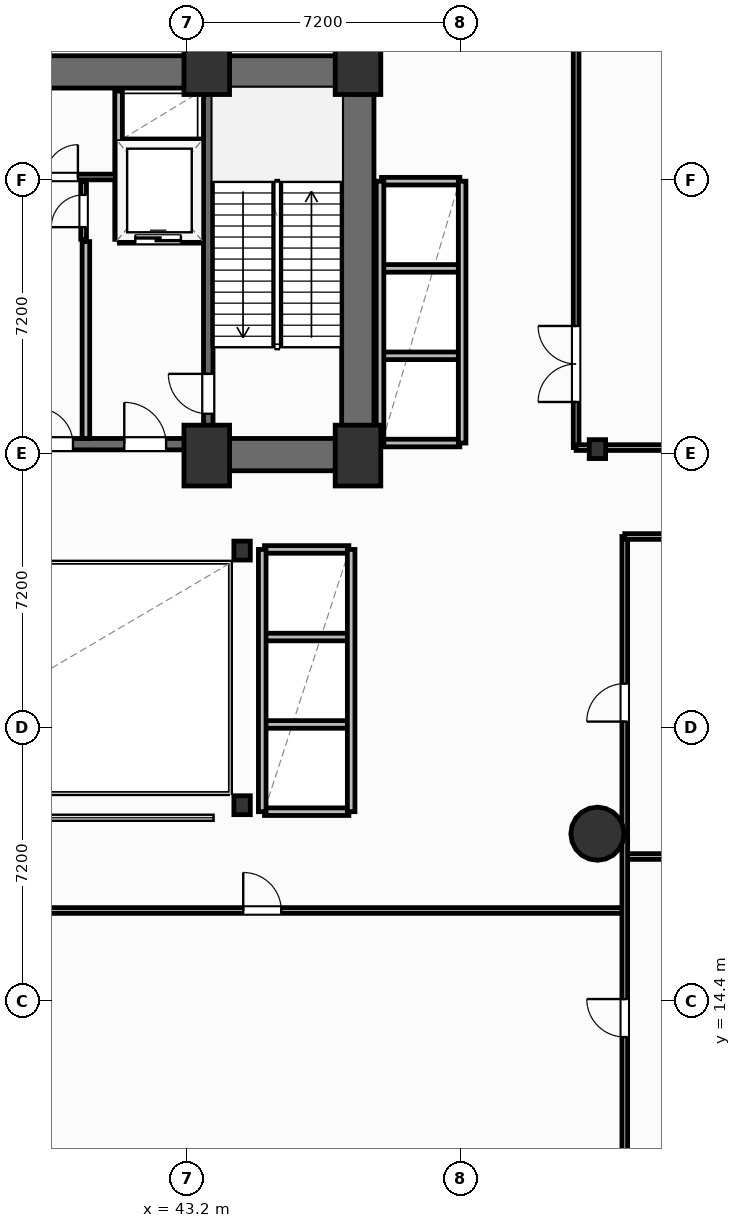
"""IFC4 building model, lengths in metres.
Left out: names, types, materials, properties, quantities, classifications, styles, units other than length and angle.
Written with IfcOpenShell. Run it as: python <this file> out.ifc"""

import sys

from ifc_helpers import new_model, si_unit, direction, frame, frame_2d, origin, origin_2d, place, context, subcontext, project, spatial, rectangle, circle, i_section, extrude, element, fill, save


model = new_model("IFC4")
c1 = context("Model", 3, precision=1e-05, world=origin(), true_north=direction((0.0, 1.0)))
c2 = subcontext(c1, "Body", "Model", "MODEL_VIEW")
j1 = project(units=[si_unit("LENGTHUNIT", "METRE"), si_unit("PLANEANGLEUNIT", "RADIAN")], contexts=[c1])
p1 = place(None, origin())
s1 = spatial("IfcSite", under=j1, at=p1, CompositionType="ELEMENT")
p2 = place(p1, origin())
s2 = spatial("IfcBuilding", under=s1, at=p2, CompositionType="ELEMENT")
p3 = place(p2, frame((0.0, 0.0, 21.6)))
s3 = spatial("IfcBuildingStorey", under=s2, at=p3, CompositionType="ELEMENT", Elevation=21.6)
for number, where, z_axis, x_axis in (
    (1, (43.72, 28.75, 0.0), (0.0, 0.0, 1.0), (1.0, 0.0, 0.0)),
    (2, (47.7, 28.75, 0.0), (0.0, 0.0, 1.0), (1.0, 0.0, 0.0)),
    (3, (43.72, 39.05, 0.0), (0.0, 0.0, 1.0), (1.0, 0.0, 0.0)),
    (4, (47.7, 39.05, 0.0), (0.0, 0.0, 1.0), (1.0, 0.0, 0.0)),
):
    element("IfcColumn", number, at=place(p3, frame(where, z_axis=z_axis, x_axis=x_axis)), inside=s3, PredefinedType="COLUMN", context=c2, shape_type="SweptSolid", body=[
        extrude(rectangle(XDim=1.2, YDim=1.6, at=origin_2d()), origin(), (0.0, 0.0, 1.0), 5.4),
    ])
for number, where, z_axis, x_axis in (
    (5, (44.65, 19.55, 0.0), (0.0, 0.0, 1.0), (1.0, 0.0, 0.0)),
    (6, (44.65, 26.25, 0.0), (0.0, 0.0, 1.0), (1.0, 0.0, 0.0)),
    (7, (54.0, 28.92, 0.0), (0.0, 0.0, 1.0), (1.0, 0.0, 0.0)),
):
    element("IfcColumn", number, at=place(p3, frame(where, z_axis=z_axis, x_axis=x_axis)), inside=s3, PredefinedType="COLUMN", context=c2, shape_type="SweptSolid", body=[
        extrude(i_section(OverallWidth=0.432, OverallDepth=0.498, WebThickness=0.056, FlangeThickness=0.089, FilletRadius=0.025, at=origin_2d()), origin(), (0.0, 0.0, 1.0), 5.4),
    ])
p4 = place(p3, frame((30.28, 38.845, 0.0), z_axis=(0.0, 0.0, 1.0), x_axis=(1.0, 0.0, 0.0)))
e8 = element("IfcWall", 8, at=p4, inside=s3, PredefinedType="SHEAR", context=c2, shape_type="SweptSolid", body=[
    extrude(rectangle(XDim=17.84, YDim=0.85, at=frame_2d((8.92, 0.0))), origin(), (0.0, 0.0, 1.0), 5.15),
])
p5 = place(p3, frame((47.695, 29.2, 0.0), z_axis=(0.0, 0.0, 1.0), x_axis=(0.0, 1.0, 0.0)))
e9 = element("IfcWall", 9, at=p5, inside=s3, PredefinedType="SHEAR", context=c2, shape_type="SweptSolid", body=[
    extrude(rectangle(XDim=9.22, YDim=0.85, at=frame_2d((4.61, 0.0))), origin(), (0.0, 0.0, 1.0), 5.15),
])
p6 = place(p3, frame((43.6, 28.775, 0.0), z_axis=(0.0, 0.0, 1.0), x_axis=(1.0, 0.0, 0.0)))
e10 = element("IfcWall", 10, at=p6, inside=s3, PredefinedType="SHEAR", context=c2, shape_type="SweptSolid", body=[
    extrude(rectangle(XDim=4.52, YDim=0.85, at=frame_2d((2.26, 0.0))), origin(), (0.0, 0.0, 1.0), 5.15),
])
p7 = place(p3, frame((34.8, 29.05, 0.0), z_axis=(0.0, 0.0, 1.0), x_axis=(1.0, 0.0, 0.0)))
e11 = element("IfcWall", 11, at=p7, inside=s3, PredefinedType="SHEAR", context=c2, shape_type="SweptSolid", body=[
    extrude(rectangle(XDim=8.8, YDim=0.3, at=frame_2d((4.4, 0.0))), origin(), (0.0, 0.0, 1.0), 5.15),
])
p8 = place(p7, frame((0.95, 0.0, 0.0)))
e12 = element("IfcOpeningElement", 12, at=p8, cuts=e11, PredefinedType="OPENING", context=c2, shape_type="SweptSolid", body=[
    extrude(rectangle(XDim=1.1, YDim=2.15, at=frame_2d((0.55, 1.075))), frame((0.0, 0.16, 0.0), z_axis=(0.0, -1.0, 0.0), x_axis=(1.0, 0.0, 0.0)), (0.0, 0.0, 1.0), 0.32),
])
p9 = place(p7, frame((6.75, 0.0, 0.0)))
e13 = element("IfcOpeningElement", 13, at=p9, cuts=e11, PredefinedType="OPENING", context=c2, shape_type="SweptSolid", body=[
    extrude(rectangle(XDim=1.1, YDim=2.15, at=frame_2d((0.55, 1.075))), frame((0.0, 0.16, 0.0), z_axis=(0.0, -1.0, 0.0), x_axis=(1.0, 0.0, 0.0)), (0.0, 0.0, 1.0), 0.32),
])
p10 = place(p7, frame((4.45, 0.0, 0.0)))
e14 = element("IfcOpeningElement", 14, at=p10, cuts=e11, PredefinedType="OPENING", context=c2, shape_type="SweptSolid", body=[
    extrude(rectangle(XDim=0.95, YDim=2.15, at=frame_2d((0.475, 1.075))), frame((0.0, 0.16, 0.0), z_axis=(0.0, -1.0, 0.0), x_axis=(1.0, 0.0, 0.0)), (0.0, 0.0, 1.0), 0.32),
])
p11 = place(p3, frame((43.76, 29.2, 0.0), z_axis=(0.0, 0.0, 1.0), x_axis=(0.0, 1.0, 0.0)))
e15 = element("IfcWall", 15, at=p11, inside=s3, PredefinedType="SHEAR", context=c2, shape_type="SweptSolid", body=[
    extrude(rectangle(XDim=9.22, YDim=0.25, at=frame_2d((4.61, 0.0))), origin(), (0.0, 0.0, 1.0), 5.15),
])
p12 = place(p11, frame((0.65, 0.0, 0.0)))
e16 = element("IfcOpeningElement", 16, at=p12, cuts=e15, PredefinedType="OPENING", context=c2, shape_type="SweptSolid", body=[
    extrude(rectangle(XDim=1.05, YDim=2.15, at=frame_2d((0.525, 1.075))), frame((0.0, 0.135, 0.0), z_axis=(0.0, -1.0, 0.0), x_axis=(1.0, 0.0, 0.0)), (0.0, 0.0, 1.0), 0.27),
])
p13 = place(p3, frame((54.0, 18.8, 0.0), z_axis=(0.0, 0.0, 1.0), x_axis=(1.0, 0.0, 0.0)))
e17 = element("IfcColumn", 17, at=p13, inside=s3, PredefinedType="COLUMN", context=c2, shape_type="SweptSolid", body=[
    extrude(circle(Radius=0.7, at=origin_2d()), origin(), (0.0, 0.0, 1.0), 5.4),
])
p14 = place(p3, frame((54.72, 18.2, 0.0), z_axis=(0.0, 0.0, 1.0), x_axis=(1.0, 0.0, 0.0)))
e18 = element("IfcWall", 18, at=p14, inside=s3, PredefinedType="PARTITIONING", context=c2, shape_type="SweptSolid", body=[
    extrude(rectangle(XDim=23.48, YDim=0.15, at=frame_2d((11.74, 0.0))), origin(), (0.0, 0.0, 1.0), 1.935),
])
p15 = place(p3, frame((23.68, 16.78, 0.0), z_axis=(0.0, 0.0, 1.0), x_axis=(1.0, 0.0, 0.0)))
e19 = element("IfcWall", 19, at=p15, inside=s3, PredefinedType="PARTITIONING", context=c2, shape_type="SweptSolid", body=[
    extrude(rectangle(XDim=31.04, YDim=0.15, at=frame_2d((15.52, 0.0))), origin(), (0.0, 0.0, 1.0), 5.15),
])
p16 = place(p15, frame((6.5, 0.0, 0.0)))
e20 = element("IfcOpeningElement", 20, at=p16, cuts=e19, PredefinedType="OPENING", context=c2, shape_type="SweptSolid", body=[
    extrude(rectangle(XDim=1.0, YDim=2.05, at=frame_2d((0.5, 1.025))), frame((0.0, 0.085, 0.0), z_axis=(0.0, -1.0, 0.0), x_axis=(1.0, 0.0, 0.0)), (0.0, 0.0, 1.0), 0.17),
])
p17 = place(p15, frame((21.0, 0.0, 0.0)))
e21 = element("IfcOpeningElement", 21, at=p17, cuts=e19, PredefinedType="OPENING", context=c2, shape_type="SweptSolid", body=[
    extrude(rectangle(XDim=1.0, YDim=2.05, at=frame_2d((0.5, 1.025))), frame((0.0, 0.085, 0.0), z_axis=(0.0, -1.0, 0.0), x_axis=(1.0, 0.0, 0.0)), (0.0, 0.0, 1.0), 0.17),
])
p18 = place(p3, frame((54.72, 0.25, 0.0), z_axis=(0.0, 0.0, 1.0), x_axis=(0.0, 1.0, 0.0)))
e22 = element("IfcWall", 22, at=p18, inside=s3, PredefinedType="PARTITIONING", context=c2, shape_type="SweptSolid", body=[
    extrude(rectangle(XDim=26.37, YDim=0.15, at=frame_2d((13.185, 0.0))), origin(), (0.0, 0.0, 1.0), 5.15),
])
p19 = place(p18, frame((21.5, 0.0, 0.0)))
e23 = element("IfcOpeningElement", 23, at=p19, cuts=e22, PredefinedType="OPENING", context=c2, shape_type="SweptSolid", body=[
    extrude(rectangle(XDim=1.0, YDim=2.05, at=frame_2d((0.5, 1.025))), frame((0.0, 0.085, 0.0), z_axis=(0.0, -1.0, 0.0), x_axis=(1.0, 0.0, 0.0)), (0.0, 0.0, 1.0), 0.17),
])
p20 = place(p18, frame((13.2, 0.0, 0.0)))
e24 = element("IfcOpeningElement", 24, at=p20, cuts=e22, PredefinedType="OPENING", context=c2, shape_type="SweptSolid", body=[
    extrude(rectangle(XDim=1.0, YDim=2.05, at=frame_2d((0.5, 1.025))), frame((0.0, 0.085, 0.0), z_axis=(0.0, -1.0, 0.0), x_axis=(1.0, 0.0, 0.0)), (0.0, 0.0, 1.0), 0.17),
])
p21 = place(p3, frame((54.72, 26.62, 0.0), z_axis=(0.0, 0.0, 1.0), x_axis=(1.0, 0.0, 0.0)))
e25 = element("IfcWall", 25, at=p21, inside=s3, PredefinedType="PARTITIONING", context=c2, shape_type="SweptSolid", body=[
    extrude(rectangle(XDim=23.48, YDim=0.15, at=frame_2d((11.74, 0.0))), origin(), (0.0, 0.0, 1.0), 5.15),
])
p22 = place(p3, frame((53.44, 28.96, 0.0), z_axis=(0.0, 0.0, 1.0), x_axis=(0.0, 1.0, 0.0)))
e26 = element("IfcWall", 26, at=p22, inside=s3, PredefinedType="PARTITIONING", context=c2, shape_type="SweptSolid", body=[
    extrude(rectangle(XDim=21.34, YDim=0.15, at=frame_2d((10.67, 0.0))), origin(), (0.0, 0.0, 1.0), 5.15),
])
p23 = place(p22, frame((1.2, 0.0, 0.0)))
e27 = element("IfcOpeningElement", 27, at=p23, cuts=e26, PredefinedType="OPENING", context=c2, shape_type="SweptSolid", body=[
    extrude(rectangle(XDim=2.0, YDim=2.05, at=frame_2d((1.0, 1.025))), frame((0.0, 0.085, 0.0), z_axis=(0.0, -1.0, 0.0), x_axis=(1.0, 0.0, 0.0)), (0.0, 0.0, 1.0), 0.17),
])
p24 = place(p3, frame((53.44, 28.96, 0.0), z_axis=(0.0, 0.0, 1.0), x_axis=(1.0, 0.0, 0.0)))
e28 = element("IfcWall", 28, at=p24, inside=s3, PredefinedType="PARTITIONING", context=c2, shape_type="SweptSolid", body=[
    extrude(rectangle(XDim=24.76, YDim=0.15, at=frame_2d((12.38, 0.0))), origin(), (0.0, 0.0, 1.0), 1.935),
])
p25 = place(p3, frame((40.54, 29.2, 0.0), z_axis=(0.0, 0.0, 1.0), x_axis=(0.0, 1.0, 0.0)))
e29 = element("IfcWall", 29, at=p25, inside=s3, PredefinedType="PARTITIONING", context=c2, shape_type="SweptSolid", body=[
    extrude(rectangle(XDim=5.18, YDim=0.2, at=frame_2d((2.59, 0.0))), origin(), (0.0, 0.0, 1.0), 5.15),
])
p26 = place(p3, frame((41.42, 34.44, 0.0), z_axis=(0.0, 0.0, 1.0), x_axis=(1.0, 0.0, 0.0)))
e30 = element("IfcWall", 30, at=p26, inside=s3, PredefinedType="PARTITIONING", context=c2, shape_type="SweptSolid", body=[
    extrude(rectangle(XDim=2.18, YDim=0.2, at=frame_2d((1.09, 0.0))), origin(), (0.0, 0.0, 1.0), 5.15),
])
p27 = place(p26, frame((0.42, 0.0, 0.0)))
e31 = element("IfcOpeningElement", 31, at=p27, cuts=e30, PredefinedType="OPENING", context=c2, shape_type="SweptSolid", body=[
    extrude(rectangle(XDim=1.2, YDim=2.2, at=frame_2d((0.6, 1.1))), frame((0.0, 0.11, 0.0), z_axis=(0.0, -1.0, 0.0), x_axis=(1.0, 0.0, 0.0)), (0.0, 0.0, 1.0), 0.22),
])
p28 = place(p3, frame((41.42, 36.98, 0.0), z_axis=(0.0, 0.0, 1.0), x_axis=(1.0, 0.0, 0.0)))
e32 = element("IfcWall", 32, at=p28, inside=s3, PredefinedType="PARTITIONING", context=c2, shape_type="SweptSolid", body=[
    extrude(rectangle(XDim=2.18, YDim=0.2, at=frame_2d((1.09, 0.0))), origin(), (0.0, 0.0, 1.0), 5.15),
])
p29 = place(p3, frame((41.4, 34.44, 0.0), z_axis=(0.0, 0.0, 1.0), x_axis=(0.0, 1.0, 0.0)))
e33 = element("IfcWall", 33, at=p29, inside=s3, PredefinedType="PARTITIONING", context=c2, shape_type="SweptSolid", body=[
    extrude(rectangle(XDim=3.9, YDim=0.2, at=frame_2d((1.95, 0.0))), origin(), (0.0, 0.0, 1.0), 5.15),
])
p30 = place(p3, frame((39.3, 36.08, 0.0), z_axis=(0.0, 0.0, 1.0), x_axis=(1.0, 0.0, 0.0)))
e34 = element("IfcWall", 34, at=p30, inside=s3, PredefinedType="PARTITIONING", context=c2, shape_type="SweptSolid", body=[
    extrude(rectangle(XDim=2.02, YDim=0.15, at=frame_2d((1.01, 0.0))), origin(), (0.0, 0.0, 1.0), 5.15),
])
p31 = place(p30, frame((0.18, 0.0, 0.0)))
e35 = element("IfcOpeningElement", 35, at=p31, cuts=e34, PredefinedType="OPENING", context=c2, shape_type="SweptSolid", body=[
    extrude(rectangle(XDim=0.85, YDim=2.05, at=frame_2d((0.425, 1.025))), frame((0.0, 0.085, 0.0), z_axis=(0.0, -1.0, 0.0), x_axis=(1.0, 0.0, 0.0)), (0.0, 0.0, 1.0), 0.17),
])
p32 = place(p3, frame((40.48, 34.44, 0.0), z_axis=(0.0, 0.0, 1.0), x_axis=(0.0, 1.0, 0.0)))
e36 = element("IfcWall", 36, at=p32, inside=s3, PredefinedType="PARTITIONING", context=c2, shape_type="SweptSolid", body=[
    extrude(rectangle(XDim=1.52, YDim=0.15, at=frame_2d((0.76, 0.0))), origin(), (0.0, 0.0, 1.0), 5.15),
])
p33 = place(p32, frame((0.32, 0.0, 0.0)))
e37 = element("IfcOpeningElement", 37, at=p33, cuts=e36, PredefinedType="OPENING", context=c2, shape_type="SweptSolid", body=[
    extrude(rectangle(XDim=0.85, YDim=2.05, at=frame_2d((0.425, 1.025))), frame((0.0, 0.085, 0.0), z_axis=(0.0, -1.0, 0.0), x_axis=(1.0, 0.0, 0.0)), (0.0, 0.0, 1.0), 0.17),
])
for number, where, z_axis, x_axis in (
    (38, (48.32, 31.375, 0.0), (0.0, 0.0, 1.0), (1.0, 0.0, 0.0)),
    (39, (48.32, 33.675, 0.0), (0.0, 0.0, 1.0), (1.0, 0.0, 0.0)),
):
    element("IfcWall", number, at=place(p3, frame(where, z_axis=z_axis, x_axis=x_axis)), inside=s3, PredefinedType="PARTITIONING", context=c2, shape_type="SweptSolid", body=[
        extrude(rectangle(XDim=2.06, YDim=0.2, at=frame_2d((1.03, 0.0))), origin(), (0.0, 0.0, 1.0), 5.15),
    ])
p34 = place(p3, frame((48.32, 29.08, 0.0), z_axis=(0.0, 0.0, 1.0), x_axis=(1.0, 0.0, 0.0)))
e40 = element("IfcWall", 40, at=p34, inside=s3, PredefinedType="PARTITIONING", context=c2, shape_type="SweptSolid", body=[
    extrude(rectangle(XDim=2.06, YDim=0.2, at=frame_2d((1.03, 0.0))), origin(), (0.0, 0.0, 1.0), 4.362),
])
p35 = place(p3, frame((48.32, 35.97, 0.0), z_axis=(0.0, 0.0, 1.0), x_axis=(1.0, 0.0, 0.0)))
e41 = element("IfcWall", 41, at=p35, inside=s3, PredefinedType="PARTITIONING", context=c2, shape_type="SweptSolid", body=[
    extrude(rectangle(XDim=2.06, YDim=0.2, at=frame_2d((1.03, 0.0))), origin(), (0.0, 0.0, 1.0), 5.15),
])
for number, where, z_axis, x_axis in (
    (42, (48.28, 29.08, 0.0), (0.0, 0.0, 1.0), (0.0, 1.0, 0.0)),
    (43, (50.44, 29.08, 0.0), (0.0, 0.0, 1.0), (0.0, 1.0, 0.0)),
):
    element("IfcWall", number, at=place(p3, frame(where, z_axis=z_axis, x_axis=x_axis)), inside=s3, PredefinedType="PARTITIONING", context=c2, shape_type="SweptSolid", body=[
        extrude(rectangle(XDim=6.89, YDim=0.2, at=frame_2d((3.445, 0.0))), origin(), (0.0, 0.0, 1.0), 5.15),
    ])
for number, where, z_axis, x_axis in (
    (44, (45.24, 21.675, 0.0), (0.0, 0.0, 1.0), (1.0, 0.0, 0.0)),
    (45, (45.24, 23.975, 0.0), (0.0, 0.0, 1.0), (1.0, 0.0, 0.0)),
):
    element("IfcWall", number, at=place(p3, frame(where, z_axis=z_axis, x_axis=x_axis)), inside=s3, PredefinedType="PARTITIONING", context=c2, shape_type="SweptSolid", body=[
        extrude(rectangle(XDim=2.22, YDim=0.2, at=frame_2d((1.11, 0.0))), origin(), (0.0, 0.0, 1.0), 5.15),
    ])
p36 = place(p3, frame((45.24, 19.38, 0.0), z_axis=(0.0, 0.0, 1.0), x_axis=(1.0, 0.0, 0.0)))
e46 = element("IfcWall", 46, at=p36, inside=s3, PredefinedType="PARTITIONING", context=c2, shape_type="SweptSolid", body=[
    extrude(rectangle(XDim=2.22, YDim=0.2, at=frame_2d((1.11, 0.0))), origin(), (0.0, 0.0, 1.0), 4.362),
])
p37 = place(p3, frame((45.24, 26.28, 0.0), z_axis=(0.0, 0.0, 1.0), x_axis=(1.0, 0.0, 0.0)))
e47 = element("IfcWall", 47, at=p37, inside=s3, PredefinedType="PARTITIONING", context=c2, shape_type="SweptSolid", body=[
    extrude(rectangle(XDim=2.22, YDim=0.2, at=frame_2d((1.11, 0.0))), origin(), (0.0, 0.0, 1.0), 5.15),
])
for number, where, z_axis, x_axis in (
    (48, (45.18, 19.38, 0.0), (0.0, 0.0, 1.0), (0.0, 1.0, 0.0)),
    (49, (47.52, 19.38, 0.0), (0.0, 0.0, 1.0), (0.0, 1.0, 0.0)),
):
    element("IfcWall", number, at=place(p3, frame(where, z_axis=z_axis, x_axis=x_axis)), inside=s3, PredefinedType="PARTITIONING", context=c2, shape_type="SweptSolid", body=[
        extrude(rectangle(XDim=6.9, YDim=0.2, at=frame_2d((3.45, 0.0))), origin(), (0.0, 0.0, 1.0), 5.15),
    ])
p38 = place(p17, origin())
e50 = element("IfcDoor", 50, at=p38, inside=s3, OperationType="SINGLE_SWING_LEFT", PredefinedType="DOOR", context=c2, shape_type="SweptSolid", body=[
    extrude(rectangle(XDim=1.0, YDim=2.05, at=frame_2d((0.5, 1.025))), frame((0.0, 0.025, 0.0), z_axis=(0.0, -1.0, 0.0), x_axis=(1.0, 0.0, 0.0)), (0.0, 0.0, 1.0), 0.05),
])
fill(e21, e50)
p39 = place(p19, origin())
e51 = element("IfcDoor", 51, at=p39, inside=s3, OperationType="SINGLE_SWING_LEFT", PredefinedType="DOOR", context=c2, shape_type="SweptSolid", body=[
    extrude(rectangle(XDim=1.0, YDim=2.05, at=frame_2d((0.5, 1.025))), frame((0.0, 0.025, 0.0), z_axis=(0.0, -1.0, 0.0), x_axis=(1.0, 0.0, 0.0)), (0.0, 0.0, 1.0), 0.05),
])
fill(e23, e51)
p40 = place(p20, origin())
e52 = element("IfcDoor", 52, at=p40, inside=s3, OperationType="SINGLE_SWING_RIGHT", PredefinedType="DOOR", context=c2, shape_type="SweptSolid", body=[
    extrude(rectangle(XDim=1.0, YDim=2.05, at=frame_2d((0.5, 1.025))), frame((0.0, 0.025, 0.0), z_axis=(0.0, -1.0, 0.0), x_axis=(1.0, 0.0, 0.0)), (0.0, 0.0, 1.0), 0.05),
])
fill(e24, e52)
p41 = place(p23, origin())
e53 = element("IfcDoor", 53, at=p41, inside=s3, OperationType="DOUBLE_DOOR_SINGLE_SWING", PredefinedType="DOOR", context=c2, shape_type="SweptSolid", body=[
    extrude(rectangle(XDim=2.0, YDim=2.05, at=frame_2d((1.0, 1.025))), frame((0.0, 0.025, 0.0), z_axis=(0.0, -1.0, 0.0), x_axis=(1.0, 0.0, 0.0)), (0.0, 0.0, 1.0), 0.05),
])
fill(e27, e53)
p42 = place(p12, origin())
e54 = element("IfcDoor", 54, at=p42, inside=s3, OperationType="SINGLE_SWING_RIGHT", PredefinedType="DOOR", context=c2, shape_type="SweptSolid", body=[
    extrude(rectangle(XDim=1.05, YDim=2.15, at=frame_2d((0.525, 1.075))), frame((0.0, 0.025, 0.0), z_axis=(0.0, -1.0, 0.0), x_axis=(1.0, 0.0, 0.0)), (0.0, 0.0, 1.0), 0.05),
])
fill(e16, e54)
p43 = place(p9, origin())
e55 = element("IfcDoor", 55, at=p43, inside=s3, OperationType="SINGLE_SWING_LEFT", PredefinedType="DOOR", context=c2, shape_type="SweptSolid", body=[
    extrude(rectangle(XDim=1.1, YDim=2.15, at=frame_2d((0.55, 1.075))), frame((0.0, 0.025, 0.0), z_axis=(0.0, -1.0, 0.0), x_axis=(1.0, 0.0, 0.0)), (0.0, 0.0, 1.0), 0.05),
])
fill(e13, e55)
p44 = place(p27, origin())
e56 = element("IfcDoor", 56, at=p44, inside=s3, OperationType="SLIDING_TO_LEFT", PredefinedType="DOOR", context=c2, shape_type="SweptSolid", body=[
    extrude(rectangle(XDim=1.2, YDim=2.2, at=frame_2d((0.6, 1.1))), frame((0.0, 0.025, 0.0), z_axis=(0.0, -1.0, 0.0), x_axis=(1.0, 0.0, 0.0)), (0.0, 0.0, 1.0), 0.05),
])
fill(e31, e56)
p45 = place(p31, origin())
e57 = element("IfcDoor", 57, at=p45, inside=s3, OperationType="SINGLE_SWING_RIGHT", PredefinedType="DOOR", context=c2, shape_type="SweptSolid", body=[
    extrude(rectangle(XDim=0.85, YDim=2.05, at=frame_2d((0.425, 1.025))), frame((0.0, 0.025, 0.0), z_axis=(0.0, -1.0, 0.0), x_axis=(1.0, 0.0, 0.0)), (0.0, 0.0, 1.0), 0.05),
])
fill(e35, e57)
p46 = place(p33, origin())
e58 = element("IfcDoor", 58, at=p46, inside=s3, OperationType="SINGLE_SWING_LEFT", PredefinedType="DOOR", context=c2, shape_type="SweptSolid", body=[
    extrude(rectangle(XDim=0.85, YDim=2.05, at=frame_2d((0.425, 1.025))), frame((0.0, 0.025, 0.0), z_axis=(0.0, -1.0, 0.0), x_axis=(1.0, 0.0, 0.0)), (0.0, 0.0, 1.0), 0.05),
])
fill(e37, e58)
p47 = place(p10, origin())
e59 = element("IfcDoor", 59, at=p47, inside=s3, OperationType="SINGLE_SWING_LEFT", PredefinedType="DOOR", context=c2, shape_type="SweptSolid", body=[
    extrude(rectangle(XDim=0.95, YDim=2.15, at=frame_2d((0.475, 1.075))), frame((0.0, 0.025, 0.0), z_axis=(0.0, -1.0, 0.0), x_axis=(1.0, 0.0, 0.0)), (0.0, 0.0, 1.0), 0.05),
])
fill(e14, e59)
save(model, sys.argv[1])
